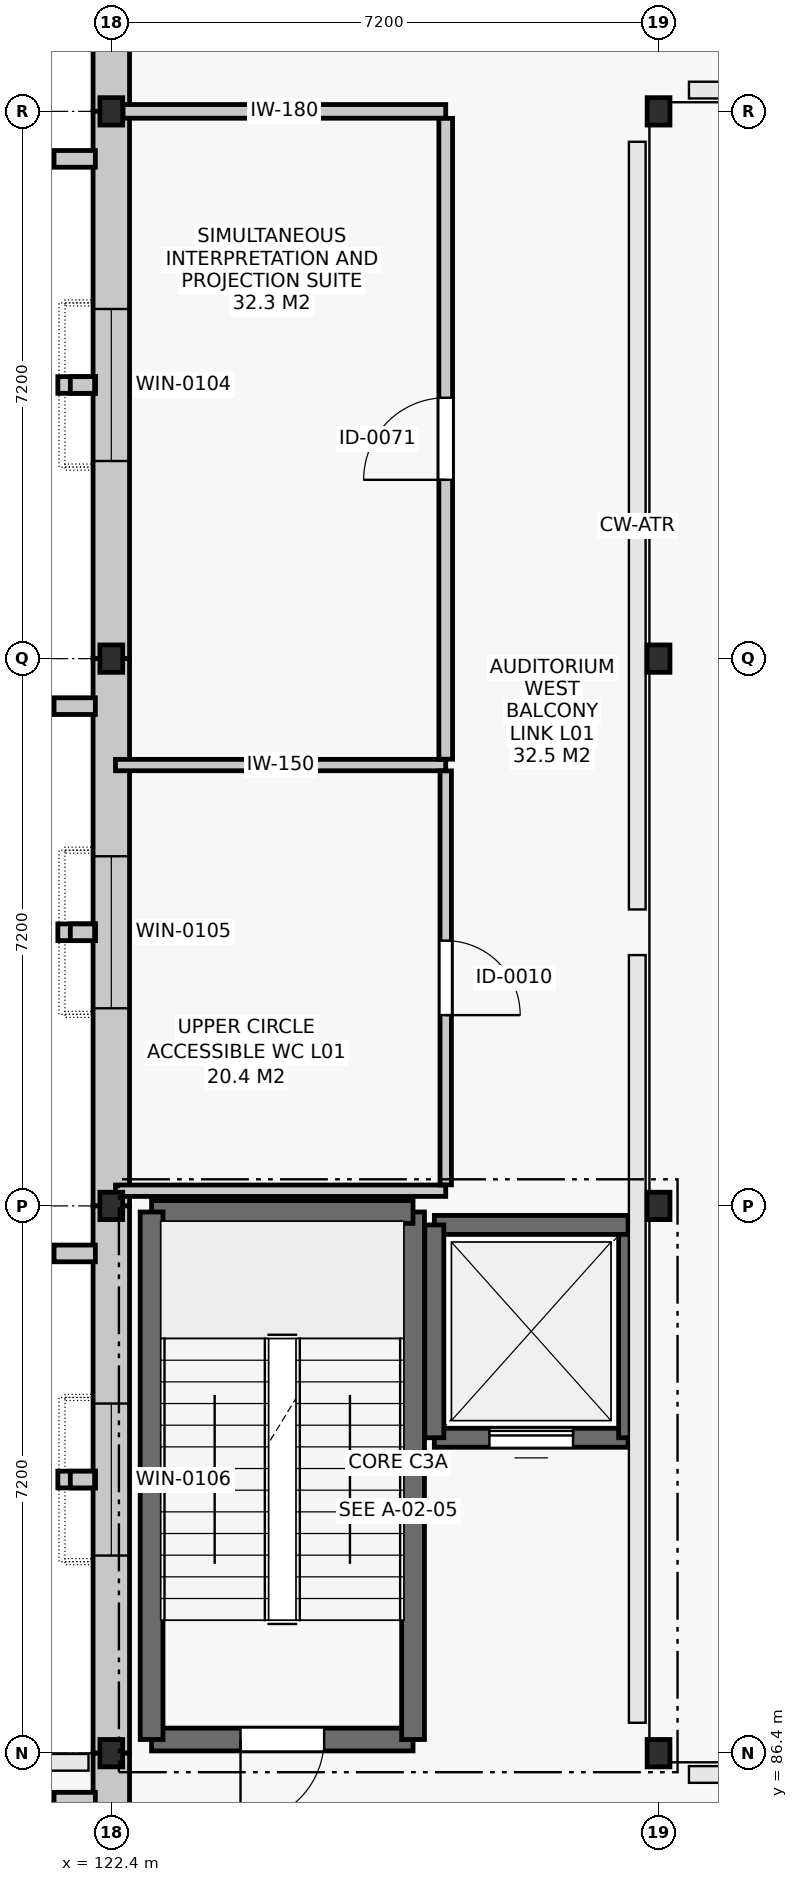
"""IFC4 building model, lengths in metres.
Left out: names, types, materials, properties, quantities, classifications, styles, units other than length and angle.
Written with IfcOpenShell. Run it as: python <this file> out.ifc"""

import sys

from ifc_helpers import new_model, si_unit, direction, frame, frame_2d, origin, origin_2d, place, context, subcontext, project, spatial, rectangle, i_section, extrude, element, fill, save


model = new_model("IFC4")
c1 = context("Model", 3, precision=1e-05, world=origin(), true_north=direction((0.0, 1.0)))
c2 = subcontext(c1, "Body", "Model", "MODEL_VIEW")
j1 = project(units=[si_unit("LENGTHUNIT", "METRE"), si_unit("PLANEANGLEUNIT", "RADIAN")], contexts=[c1])
p1 = place(None, origin())
s1 = spatial("IfcSite", under=j1, at=p1, CompositionType="ELEMENT")
p2 = place(p1, origin())
s2 = spatial("IfcBuilding", under=s1, at=p2, CompositionType="ELEMENT")
p3 = place(p2, frame((0.0, 0.0, 5.4)))
s3 = spatial("IfcBuildingStorey", under=s2, at=p3, CompositionType="ELEMENT", Elevation=5.4)
for number, where, z_axis, x_axis in (
    (1, (122.4, 86.4, 0.0), (0.0, 0.0, 1.0), (1.0, 0.0, 0.0)),
    (2, (122.4, 93.6, 0.0), (0.0, 0.0, 1.0), (1.0, 0.0, 0.0)),
    (3, (122.4, 100.8, 0.0), (0.0, 0.0, 1.0), (1.0, 0.0, 0.0)),
    (4, (122.4, 108.0, 0.0), (0.0, 0.0, 1.0), (1.0, 0.0, 0.0)),
    (5, (129.6, 86.4, 0.0), (0.0, 0.0, 1.0), (1.0, 0.0, 0.0)),
    (6, (129.6, 93.6, 0.0), (0.0, 0.0, 1.0), (1.0, 0.0, 0.0)),
    (7, (129.6, 100.8, 0.0), (0.0, 0.0, 1.0), (1.0, 0.0, 0.0)),
    (8, (129.6, 108.0, 0.0), (0.0, 0.0, 1.0), (1.0, 0.0, 0.0)),
):
    element("IfcColumn", number, at=place(p3, frame(where, z_axis=z_axis, x_axis=x_axis)), inside=s3, PredefinedType="COLUMN", context=c2, shape_type="SweptSolid", body=[
        extrude(i_section(OverallWidth=0.3, OverallDepth=0.36, WebThickness=0.012, FlangeThickness=0.022, FilletRadius=0.027, at=origin_2d()), origin(), (0.0, 0.0, 1.0), 4.8),
    ])
p4 = place(p3, frame((122.4, 115.016, 0.0), z_axis=(0.0, 0.0, 1.0), x_axis=(0.0, -1.0, 0.0)))
e9 = element("IfcWall", 9, at=p4, inside=s3, PredefinedType="SOLIDWALL", context=c2, shape_type="SweptSolid", body=[
    extrude(rectangle(XDim=7.016, YDim=0.48, at=frame_2d((3.508, 0.0))), origin(), (0.0, 0.0, 1.0), 3.8),
])
p5 = place(p4, frame((2.416, 0.0, 1.35)))
e10 = element("IfcOpeningElement", 10, at=p5, cuts=e9, PredefinedType="OPENING", context=c2, shape_type="SweptSolid", body=[
    extrude(rectangle(XDim=2.0, YDim=1.5, at=frame_2d((1.0, 0.75))), frame((0.0, 0.252, 0.0), z_axis=(0.0, -1.0, 0.0), x_axis=(1.0, 0.0, 0.0)), (0.0, 0.0, 1.0), 0.504),
])
p6 = place(p3, frame((122.4, 108.0, 0.0), z_axis=(0.0, 0.0, 1.0), x_axis=(0.0, -1.0, 0.0)))
e11 = element("IfcWall", 11, at=p6, inside=s3, PredefinedType="SOLIDWALL", context=c2, shape_type="SweptSolid", body=[
    extrude(rectangle(XDim=7.2, YDim=0.48, at=frame_2d((3.6, 0.0))), origin(), (0.0, 0.0, 1.0), 3.8),
])
p7 = place(p6, frame((2.6, 0.0, 1.35)))
e12 = element("IfcOpeningElement", 12, at=p7, cuts=e11, PredefinedType="OPENING", context=c2, shape_type="SweptSolid", body=[
    extrude(rectangle(XDim=2.0, YDim=1.5, at=frame_2d((1.0, 0.75))), frame((0.0, 0.252, 0.0), z_axis=(0.0, -1.0, 0.0), x_axis=(1.0, 0.0, 0.0)), (0.0, 0.0, 1.0), 0.504),
])
p8 = place(p3, frame((122.4, 100.8, 0.0), z_axis=(0.0, 0.0, 1.0), x_axis=(0.0, -1.0, 0.0)))
e13 = element("IfcWall", 13, at=p8, inside=s3, PredefinedType="SOLIDWALL", context=c2, shape_type="SweptSolid", body=[
    extrude(rectangle(XDim=7.2, YDim=0.48, at=frame_2d((3.6, 0.0))), origin(), (0.0, 0.0, 1.0), 3.8),
])
p9 = place(p8, frame((2.6, 0.0, 1.35)))
e14 = element("IfcOpeningElement", 14, at=p9, cuts=e13, PredefinedType="OPENING", context=c2, shape_type="SweptSolid", body=[
    extrude(rectangle(XDim=2.0, YDim=1.5, at=frame_2d((1.0, 0.75))), frame((0.0, 0.252, 0.0), z_axis=(0.0, -1.0, 0.0), x_axis=(1.0, 0.0, 0.0)), (0.0, 0.0, 1.0), 0.504),
])
p10 = place(p3, frame((122.4, 93.6, 0.0), z_axis=(0.0, 0.0, 1.0), x_axis=(0.0, -1.0, 0.0)))
e15 = element("IfcWall", 15, at=p10, inside=s3, PredefinedType="SOLIDWALL", context=c2, shape_type="SweptSolid", body=[
    extrude(rectangle(XDim=7.2, YDim=0.48, at=frame_2d((3.6, 0.0))), origin(), (0.0, 0.0, 1.0), 3.8),
])
p11 = place(p10, frame((2.6, 0.0, 1.35)))
e16 = element("IfcOpeningElement", 16, at=p11, cuts=e15, PredefinedType="OPENING", context=c2, shape_type="SweptSolid", body=[
    extrude(rectangle(XDim=2.0, YDim=1.5, at=frame_2d((1.0, 0.75))), frame((0.0, 0.252, 0.0), z_axis=(0.0, -1.0, 0.0), x_axis=(1.0, 0.0, 0.0)), (0.0, 0.0, 1.0), 0.504),
])
p12 = place(p3, frame((122.4, 86.4, 0.0), z_axis=(0.0, 0.0, 1.0), x_axis=(0.0, -1.0, 0.0)))
e17 = element("IfcWall", 17, at=p12, inside=s3, PredefinedType="SOLIDWALL", context=c2, shape_type="SweptSolid", body=[
    extrude(rectangle(XDim=7.016, YDim=0.48, at=frame_2d((3.508, 0.0))), origin(), (0.0, 0.0, 1.0), 3.8),
])
p13 = place(p12, frame((2.7, 0.0, 0.0)))
e18 = element("IfcOpeningElement", 18, at=p13, cuts=e17, PredefinedType="OPENING", context=c2, shape_type="SweptSolid", body=[
    extrude(rectangle(XDim=1.8, YDim=2.3, at=frame_2d((0.9, 1.15))), frame((0.0, 0.252, 0.0), z_axis=(0.0, -1.0, 0.0), x_axis=(1.0, 0.0, 0.0)), (0.0, 0.0, 1.0), 0.504),
])
p14 = place(p3, frame((122.93, 86.58, 0.0), z_axis=(0.0, 0.0, 1.0), x_axis=(1.0, 0.0, 0.0)))
e19 = element("IfcWall", 19, at=p14, inside=s3, PredefinedType="SHEAR", context=c2, shape_type="SweptSolid", body=[
    extrude(rectangle(XDim=3.44, YDim=0.3, at=frame_2d((1.72, 0.0))), origin(), (0.0, 0.0, 1.0), 4.52),
])
p15 = place(p14, frame((1.17, 0.0, 0.0)))
e20 = element("IfcOpeningElement", 20, at=p15, cuts=e19, PredefinedType="OPENING", context=c2, shape_type="SweptSolid", body=[
    extrude(rectangle(XDim=1.1, YDim=2.15, at=frame_2d((0.55, 1.075))), frame((0.0, 0.162, 0.0), z_axis=(0.0, -1.0, 0.0), x_axis=(1.0, 0.0, 0.0)), (0.0, 0.0, 1.0), 0.324),
])
p16 = place(p3, frame((126.37, 86.58, 0.0), z_axis=(0.0, 0.0, 1.0), x_axis=(0.0, 1.0, 0.0)))
e21 = element("IfcWall", 21, at=p16, inside=s3, PredefinedType="SHEAR", context=c2, shape_type="SweptSolid", body=[
    extrude(rectangle(XDim=6.94, YDim=0.3, at=frame_2d((3.47, 0.0))), origin(), (0.0, 0.0, 1.0), 4.52),
])
p17 = place(p3, frame((126.37, 93.52, 0.0), z_axis=(0.0, 0.0, 1.0), x_axis=(-1.0, 0.0, 0.0)))
e22 = element("IfcWall", 22, at=p17, inside=s3, PredefinedType="SHEAR", context=c2, shape_type="SweptSolid", body=[
    extrude(rectangle(XDim=3.44, YDim=0.3, at=frame_2d((1.72, 0.0))), origin(), (0.0, 0.0, 1.0), 4.52),
])
p18 = place(p3, frame((122.93, 93.52, 0.0), z_axis=(0.0, 0.0, 1.0), x_axis=(0.0, -1.0, 0.0)))
e23 = element("IfcWall", 23, at=p18, inside=s3, PredefinedType="SHEAR", context=c2, shape_type="SweptSolid", body=[
    extrude(rectangle(XDim=6.94, YDim=0.3, at=frame_2d((3.47, 0.0))), origin(), (0.0, 0.0, 1.0), 4.52),
])
p19 = place(p3, frame((126.65, 90.55, 0.0), z_axis=(0.0, 0.0, 1.0), x_axis=(1.0, 0.0, 0.0)))
e24 = element("IfcWall", 24, at=p19, inside=s3, PredefinedType="SHEAR", context=c2, shape_type="SweptSolid", body=[
    extrude(rectangle(XDim=2.55, YDim=0.25, at=frame_2d((1.275, 0.0))), origin(), (0.0, 0.0, 1.0), 4.52),
])
p20 = place(p19, frame((0.725, 0.0, 0.0)))
e25 = element("IfcOpeningElement", 25, at=p20, cuts=e24, PredefinedType="OPENING", context=c2, shape_type="SweptSolid", body=[
    extrude(rectangle(XDim=1.1, YDim=2.1, at=frame_2d((0.55, 1.05))), frame((0.0, 0.137, 0.0), z_axis=(0.0, -1.0, 0.0), x_axis=(1.0, 0.0, 0.0)), (0.0, 0.0, 1.0), 0.274),
])
p21 = place(p3, frame((129.2, 90.55, 0.0), z_axis=(0.0, 0.0, 1.0), x_axis=(0.0, 1.0, 0.0)))
e26 = element("IfcWall", 26, at=p21, inside=s3, PredefinedType="SHEAR", context=c2, shape_type="SweptSolid", body=[
    extrude(rectangle(XDim=2.8, YDim=0.25, at=frame_2d((1.4, 0.0))), origin(), (0.0, 0.0, 1.0), 4.52),
])
p22 = place(p3, frame((129.2, 93.35, 0.0), z_axis=(0.0, 0.0, 1.0), x_axis=(-1.0, 0.0, 0.0)))
e27 = element("IfcWall", 27, at=p22, inside=s3, PredefinedType="SHEAR", context=c2, shape_type="SweptSolid", body=[
    extrude(rectangle(XDim=2.55, YDim=0.25, at=frame_2d((1.275, 0.0))), origin(), (0.0, 0.0, 1.0), 4.52),
])
p23 = place(p3, frame((126.65, 93.35, 0.0), z_axis=(0.0, 0.0, 1.0), x_axis=(0.0, -1.0, 0.0)))
e28 = element("IfcWall", 28, at=p23, inside=s3, PredefinedType="SHEAR", context=c2, shape_type="SweptSolid", body=[
    extrude(rectangle(XDim=2.8, YDim=0.25, at=frame_2d((1.4, 0.0))), origin(), (0.0, 0.0, 1.0), 4.52),
])
for number, where, z_axis, x_axis in (
    (29, (122.455, 93.8, 0.0), (0.0, 0.0, 1.0), (1.0, 0.0, 0.0)),
    (30, (122.455, 99.4, 0.0), (0.0, 0.0, 1.0), (1.0, 0.0, 0.0)),
):
    element("IfcWall", number, at=place(p3, frame(where, z_axis=z_axis, x_axis=x_axis)), inside=s3, PredefinedType="PARTITIONING", context=c2, shape_type="SweptSolid", body=[
        extrude(rectangle(XDim=4.345, YDim=0.15, at=frame_2d((2.172, 0.0))), origin(), (0.0, 0.0, 1.0), 3.955),
    ])
p24 = place(p3, frame((122.554, 108.0, 0.0), z_axis=(0.0, 0.0, 1.0), x_axis=(1.0, 0.0, 0.0)))
e31 = element("IfcWall", 31, at=p24, inside=s3, PredefinedType="PARTITIONING", context=c2, shape_type="SweptSolid", body=[
    extrude(rectangle(XDim=4.246, YDim=0.18, at=frame_2d((2.123, 0.0))), origin(), (0.0, 0.0, 1.0), 4.065),
])
p25 = place(p3, frame((126.8, 93.877, 0.0), z_axis=(0.0, 0.0, 1.0), x_axis=(0.0, 1.0, 0.0)))
e32 = element("IfcWall", 32, at=p25, inside=s3, PredefinedType="PARTITIONING", context=c2, shape_type="SweptSolid", body=[
    extrude(rectangle(XDim=5.446, YDim=0.15, at=frame_2d((2.723, 0.0))), origin(), (0.0, 0.0, 1.0), 4.505),
])
p26 = place(p25, frame((2.233, 0.0, 0.0)))
e33 = element("IfcOpeningElement", 33, at=p26, cuts=e32, PredefinedType="OPENING", context=c2, shape_type="SweptSolid", body=[
    extrude(rectangle(XDim=0.98, YDim=2.1, at=frame_2d((0.49, 1.05))), frame((0.0, 0.087, 0.0), z_axis=(0.0, -1.0, 0.0), x_axis=(1.0, 0.0, 0.0)), (0.0, 0.0, 1.0), 0.174),
])
p27 = place(p3, frame((126.8, 99.477, 0.0), z_axis=(0.0, 0.0, 1.0), x_axis=(0.0, 1.0, 0.0)))
e34 = element("IfcWall", 34, at=p27, inside=s3, PredefinedType="PARTITIONING", context=c2, shape_type="SweptSolid", body=[
    extrude(rectangle(XDim=8.431, YDim=0.18, at=frame_2d((4.215, 0.0))), origin(), (0.0, 0.0, 1.0), 4.065),
])
p28 = place(p27, frame((3.676, 0.0, 0.0)))
e35 = element("IfcOpeningElement", 35, at=p28, cuts=e34, PredefinedType="OPENING", context=c2, shape_type="SweptSolid", body=[
    extrude(rectangle(XDim=1.08, YDim=2.2, at=frame_2d((0.54, 1.1))), frame((0.0, 0.102, 0.0), z_axis=(0.0, -1.0, 0.0), x_axis=(1.0, 0.0, 0.0)), (0.0, 0.0, 1.0), 0.204),
])
p29 = place(p7, origin())
e36 = element("IfcWindow", 36, at=p29, inside=s3, PartitioningType="SINGLE_PANEL", PredefinedType="WINDOW", context=c2, shape_type="SweptSolid", body=[
    extrude(rectangle(XDim=2.0, YDim=1.5, at=frame_2d((1.0, 0.75))), frame((0.0, 0.03, 0.0), z_axis=(0.0, -1.0, 0.0), x_axis=(1.0, 0.0, 0.0)), (0.0, 0.0, 1.0), 0.06),
])
fill(e12, e36)
p30 = place(p9, origin())
e37 = element("IfcWindow", 37, at=p30, inside=s3, PartitioningType="SINGLE_PANEL", PredefinedType="WINDOW", context=c2, shape_type="SweptSolid", body=[
    extrude(rectangle(XDim=2.0, YDim=1.5, at=frame_2d((1.0, 0.75))), frame((0.0, 0.03, 0.0), z_axis=(0.0, -1.0, 0.0), x_axis=(1.0, 0.0, 0.0)), (0.0, 0.0, 1.0), 0.06),
])
fill(e14, e37)
p31 = place(p11, origin())
e38 = element("IfcWindow", 38, at=p31, inside=s3, PartitioningType="SINGLE_PANEL", PredefinedType="WINDOW", context=c2, shape_type="SweptSolid", body=[
    extrude(rectangle(XDim=2.0, YDim=1.5, at=frame_2d((1.0, 0.75))), frame((0.0, 0.03, 0.0), z_axis=(0.0, -1.0, 0.0), x_axis=(1.0, 0.0, 0.0)), (0.0, 0.0, 1.0), 0.06),
])
fill(e16, e38)
p32 = place(p15, frame((1.1, 0.0, 0.0), z_axis=(0.0, 0.0, 1.0), x_axis=(-1.0, 0.0, 0.0)))
e39 = element("IfcDoor", 39, at=p32, inside=s3, OperationType="SINGLE_SWING_RIGHT", PredefinedType="DOOR", context=c2, shape_type="SweptSolid", body=[
    extrude(rectangle(XDim=1.1, YDim=2.15, at=frame_2d((0.55, 1.075))), frame((0.0, 0.025, 0.0), z_axis=(0.0, -1.0, 0.0), x_axis=(1.0, 0.0, 0.0)), (0.0, 0.0, 1.0), 0.05),
])
fill(e20, e39)
p33 = place(p20, origin())
e40 = element("IfcDoor", 40, at=p33, inside=s3, OperationType="SLIDING_TO_LEFT", PredefinedType="DOOR", context=c2, shape_type="SweptSolid", body=[
    extrude(rectangle(XDim=1.1, YDim=2.1, at=frame_2d((0.55, 1.05))), frame((0.0, 0.025, 0.0), z_axis=(0.0, -1.0, 0.0), x_axis=(1.0, 0.0, 0.0)), (0.0, 0.0, 1.0), 0.05),
])
fill(e25, e40)
p34 = place(p26, frame((0.98, 0.0, 0.0), z_axis=(0.0, 0.0, 1.0), x_axis=(-1.0, 0.0, 0.0)))
e41 = element("IfcDoor", 41, at=p34, inside=s3, OperationType="SINGLE_SWING_RIGHT", PredefinedType="DOOR", context=c2, shape_type="SweptSolid", body=[
    extrude(rectangle(XDim=0.98, YDim=2.1, at=frame_2d((0.49, 1.05))), frame((0.0, 0.025, 0.0), z_axis=(0.0, -1.0, 0.0), x_axis=(1.0, 0.0, 0.0)), (0.0, 0.0, 1.0), 0.05),
])
fill(e33, e41)
p35 = place(p28, origin())
e42 = element("IfcDoor", 42, at=p35, inside=s3, OperationType="SINGLE_SWING_LEFT", PredefinedType="DOOR", context=c2, shape_type="SweptSolid", body=[
    extrude(rectangle(XDim=1.08, YDim=2.2, at=frame_2d((0.54, 1.1))), frame((0.0, 0.025, 0.0), z_axis=(0.0, -1.0, 0.0), x_axis=(1.0, 0.0, 0.0)), (0.0, 0.0, 1.0), 0.05),
])
fill(e35, e42)
save(model, sys.argv[1])
